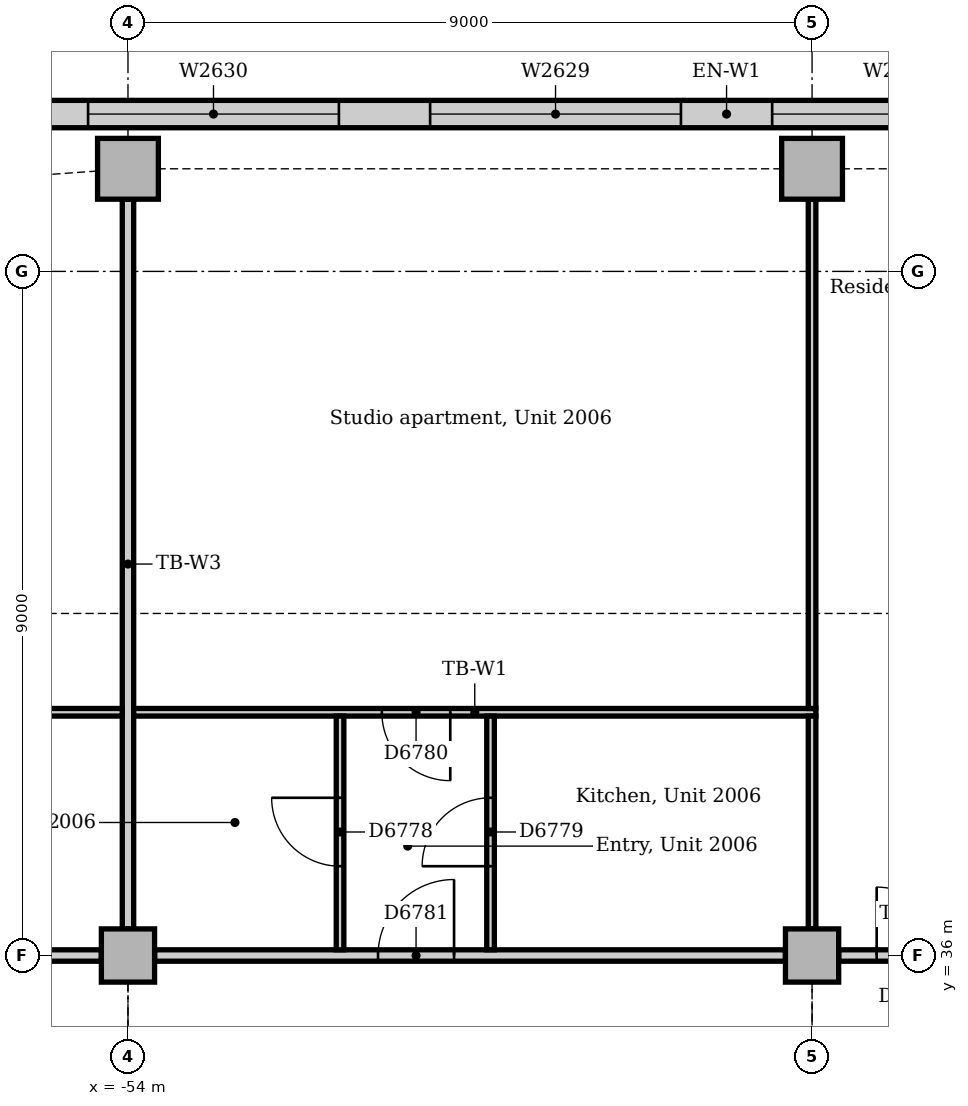
"""IFC4 building model, lengths in metres.
Left out: names, types, materials, properties, quantities, classifications, styles, units other than length and angle.
Written with IfcOpenShell. Run it as: python <this file> out.ifc"""

import sys

from ifc_helpers import new_model, si_unit, direction, frame, frame_2d, origin, origin_2d, place, context, subcontext, project, spatial, rectangle, extrude, element, fill, save


model = new_model("IFC4")
c1 = context("Model", 3, precision=1e-05, world=origin(), true_north=direction((0.0, 1.0)))
c2 = subcontext(c1, "Body", "Model", "MODEL_VIEW")
j1 = project(units=[si_unit("LENGTHUNIT", "METRE"), si_unit("PLANEANGLEUNIT", "RADIAN")], contexts=[c1])
p1 = place(None, origin())
s1 = spatial("IfcSite", under=j1, at=p1, CompositionType="ELEMENT")
p2 = place(p1, origin())
s2 = spatial("IfcBuilding", under=s1, at=p2, CompositionType="ELEMENT")
p3 = place(p2, frame((0.0, 0.0, 87.0)))
s3 = spatial("IfcBuildingStorey", under=s2, at=p3, CompositionType="ELEMENT", Elevation=87.0)
for number, where, z_axis, x_axis in (
    (1, (-54.0, 46.35, 0.0), (0.0, 0.0, 1.0), (1.0, 0.0, 0.0)),
    (2, (-45.0, 46.35, 0.0), (0.0, 0.0, 1.0), (1.0, 0.0, 0.0)),
):
    element("IfcColumn", number, at=place(p3, frame(where, z_axis=z_axis, x_axis=x_axis)), inside=s3, PredefinedType="COLUMN", context=c2, shape_type="SweptSolid", body=[
        extrude(rectangle(XDim=0.8, YDim=0.8, at=origin_2d()), origin(), (0.0, 0.0, 1.0), 3.85),
    ])
for number, where, z_axis, x_axis in (
    (3, (-54.0, 36.0, 0.0), (0.0, 0.0, 1.0), (1.0, 0.0, 0.0)),
    (4, (-45.0, 36.0, 0.0), (0.0, 0.0, 1.0), (1.0, 0.0, 0.0)),
):
    element("IfcColumn", number, at=place(p3, frame(where, z_axis=z_axis, x_axis=x_axis)), inside=s3, PredefinedType="COLUMN", context=c2, shape_type="SweptSolid", body=[
        extrude(rectangle(XDim=0.7, YDim=0.7, at=origin_2d()), origin(), (0.0, 0.0, 1.0), 3.85),
    ])
p4 = place(p3, frame((-31.243, 47.07, 0.0), z_axis=(0.0, 0.0, 1.0), x_axis=(-1.0, 0.0, 0.0)))
e5 = element("IfcWall", 5, at=p4, inside=s3, PredefinedType="STANDARD", context=c2, shape_type="SweptSolid", body=[
    extrude(rectangle(XDim=29.765, YDim=0.36, at=frame_2d((14.882, 0.0))), origin(), (0.0, 0.0, 1.0), 3.85),
])
p5 = place(p4, frame((1.982, 0.0, 0.9)))
e6 = element("IfcOpeningElement", 6, at=p5, cuts=e5, PredefinedType="OPENING", context=c2, shape_type="SweptSolid", body=[
    extrude(rectangle(XDim=3.3, YDim=1.6, at=frame_2d((1.65, 0.8))), frame((0.0, 0.19, 0.0), z_axis=(0.0, -1.0, 0.0), x_axis=(1.0, 0.0, 0.0)), (0.0, 0.0, 1.0), 0.38),
])
p6 = place(p4, frame((6.482, 0.0, 0.9)))
e7 = element("IfcOpeningElement", 7, at=p6, cuts=e5, PredefinedType="OPENING", context=c2, shape_type="SweptSolid", body=[
    extrude(rectangle(XDim=3.3, YDim=1.6, at=frame_2d((1.65, 0.8))), frame((0.0, 0.19, 0.0), z_axis=(0.0, -1.0, 0.0), x_axis=(1.0, 0.0, 0.0)), (0.0, 0.0, 1.0), 0.38),
])
p7 = place(p4, frame((10.982, 0.0, 0.9)))
e8 = element("IfcOpeningElement", 8, at=p7, cuts=e5, PredefinedType="OPENING", context=c2, shape_type="SweptSolid", body=[
    extrude(rectangle(XDim=3.3, YDim=1.6, at=frame_2d((1.65, 0.8))), frame((0.0, 0.19, 0.0), z_axis=(0.0, -1.0, 0.0), x_axis=(1.0, 0.0, 0.0)), (0.0, 0.0, 1.0), 0.38),
])
p8 = place(p4, frame((15.482, 0.0, 0.9)))
e9 = element("IfcOpeningElement", 9, at=p8, cuts=e5, PredefinedType="OPENING", context=c2, shape_type="SweptSolid", body=[
    extrude(rectangle(XDim=3.3, YDim=1.6, at=frame_2d((1.65, 0.8))), frame((0.0, 0.19, 0.0), z_axis=(0.0, -1.0, 0.0), x_axis=(1.0, 0.0, 0.0)), (0.0, 0.0, 1.0), 0.38),
])
p9 = place(p4, frame((19.982, 0.0, 0.9)))
e10 = element("IfcOpeningElement", 10, at=p9, cuts=e5, PredefinedType="OPENING", context=c2, shape_type="SweptSolid", body=[
    extrude(rectangle(XDim=3.3, YDim=1.6, at=frame_2d((1.65, 0.8))), frame((0.0, 0.19, 0.0), z_axis=(0.0, -1.0, 0.0), x_axis=(1.0, 0.0, 0.0)), (0.0, 0.0, 1.0), 0.38),
])
p10 = place(p4, frame((24.482, 0.0, 0.9)))
e11 = element("IfcOpeningElement", 11, at=p10, cuts=e5, PredefinedType="OPENING", context=c2, shape_type="SweptSolid", body=[
    extrude(rectangle(XDim=3.3, YDim=1.6, at=frame_2d((1.65, 0.8))), frame((0.0, 0.19, 0.0), z_axis=(0.0, -1.0, 0.0), x_axis=(1.0, 0.0, 0.0)), (0.0, 0.0, 1.0), 0.38),
])
p11 = place(p3, frame((-44.65, 36.0, 0.0), z_axis=(0.0, 0.0, 1.0), x_axis=(1.0, 0.0, 0.0)))
e12 = element("IfcWall", 12, at=p11, inside=s3, PredefinedType="PARTITIONING", context=c2, shape_type="SweptSolid", body=[
    extrude(rectangle(XDim=1.925, YDim=0.15, at=frame_2d((0.963, 0.0))), origin(), (0.0, 0.0, 1.0), 3.602),
])
p12 = place(p11, frame((0.5, 0.0, 0.0)))
e13 = element("IfcOpeningElement", 13, at=p12, cuts=e12, PredefinedType="OPENING", context=c2, shape_type="SweptSolid", body=[
    extrude(rectangle(XDim=0.9, YDim=2.1, at=frame_2d((0.45, 1.05))), frame((0.0, 0.085, 0.0), z_axis=(0.0, -1.0, 0.0), x_axis=(1.0, 0.0, 0.0)), (0.0, 0.0, 1.0), 0.17),
])
p13 = place(p3, frame((-53.65, 36.0, 0.0), z_axis=(0.0, 0.0, 1.0), x_axis=(1.0, 0.0, 0.0)))
e14 = element("IfcWall", 14, at=p13, inside=s3, PredefinedType="PARTITIONING", context=c2, shape_type="SweptSolid", body=[
    extrude(rectangle(XDim=8.3, YDim=0.15, at=frame_2d((4.15, 0.0))), origin(), (0.0, 0.0, 1.0), 3.158),
])
p14 = place(p13, frame((2.94, 0.0, 0.0)))
e15 = element("IfcOpeningElement", 15, at=p14, cuts=e14, PredefinedType="OPENING", context=c2, shape_type="SweptSolid", body=[
    extrude(rectangle(XDim=1.0, YDim=2.1, at=frame_2d((0.5, 1.05))), frame((0.0, 0.085, 0.0), z_axis=(0.0, -1.0, 0.0), x_axis=(1.0, 0.0, 0.0)), (0.0, 0.0, 1.0), 0.17),
])
p15 = place(p3, frame((-62.6, 36.0, 0.0), z_axis=(0.0, 0.0, 1.0), x_axis=(1.0, 0.0, 0.0)))
e16 = element("IfcWall", 16, at=p15, inside=s3, PredefinedType="PARTITIONING", context=c2, shape_type="SweptSolid", body=[
    extrude(rectangle(XDim=8.25, YDim=0.15, at=frame_2d((4.125, 0.0))), origin(), (0.0, 0.0, 1.0), 3.158),
])
p16 = place(p15, frame((1.786, 0.0, 0.0)))
e17 = element("IfcOpeningElement", 17, at=p16, cuts=e16, PredefinedType="OPENING", context=c2, shape_type="SweptSolid", body=[
    extrude(rectangle(XDim=1.0, YDim=2.1, at=frame_2d((0.5, 1.05))), frame((0.0, 0.085, 0.0), z_axis=(0.0, -1.0, 0.0), x_axis=(1.0, 0.0, 0.0)), (0.0, 0.0, 1.0), 0.17),
])
p17 = place(p3, frame((-54.0, 36.35, 0.0), z_axis=(0.0, 0.0, 1.0), x_axis=(0.0, 1.0, 0.0)))
e18 = element("IfcWall", 18, at=p17, inside=s3, PredefinedType="PARTITIONING", context=c2, shape_type="SweptSolid", body=[
    extrude(rectangle(XDim=9.6, YDim=0.15, at=frame_2d((4.8, 0.0))), origin(), (0.0, 0.0, 1.0), 3.256),
])
p18 = place(p3, frame((-53.925, 39.2, 0.0), z_axis=(0.0, 0.0, 1.0), x_axis=(1.0, 0.0, 0.0)))
e19 = element("IfcWall", 19, at=p18, inside=s3, PredefinedType="PARTITIONING", context=c2, shape_type="SweptSolid", body=[
    extrude(rectangle(XDim=8.975, YDim=0.1, at=frame_2d((4.487, 0.0))), origin(), (0.0, 0.0, 1.0), 3.85),
])
p19 = place(p18, frame((3.265, 0.0, 0.0)))
e20 = element("IfcOpeningElement", 20, at=p19, cuts=e19, PredefinedType="OPENING", context=c2, shape_type="SweptSolid", body=[
    extrude(rectangle(XDim=0.9, YDim=2.1, at=frame_2d((0.45, 1.05))), frame((0.0, 0.06, 0.0), z_axis=(0.0, -1.0, 0.0), x_axis=(1.0, 0.0, 0.0)), (0.0, 0.0, 1.0), 0.12),
])
p20 = place(p3, frame((-64.89, 39.2, 0.0), z_axis=(0.0, 0.0, 1.0), x_axis=(1.0, 0.0, 0.0)))
e21 = element("IfcWall", 21, at=p20, inside=s3, PredefinedType="PARTITIONING", context=c2, shape_type="SweptSolid", body=[
    extrude(rectangle(XDim=10.815, YDim=0.1, at=frame_2d((5.407, 0.0))), origin(), (0.0, 0.0, 1.0), 3.85),
])
p21 = place(p20, frame((4.126, 0.0, 0.0)))
e22 = element("IfcOpeningElement", 22, at=p21, cuts=e21, PredefinedType="OPENING", context=c2, shape_type="SweptSolid", body=[
    extrude(rectangle(XDim=0.9, YDim=2.1, at=frame_2d((0.45, 1.05))), frame((0.0, 0.06, 0.0), z_axis=(0.0, -1.0, 0.0), x_axis=(1.0, 0.0, 0.0)), (0.0, 0.0, 1.0), 0.12),
])
p22 = place(p3, frame((-45.0, 39.25, 0.0), z_axis=(0.0, 0.0, 1.0), x_axis=(0.0, 1.0, 0.0)))
e23 = element("IfcWall", 23, at=p22, inside=s3, PredefinedType="PARTITIONING", context=c2, shape_type="SweptSolid", body=[
    extrude(rectangle(XDim=6.7, YDim=0.1, at=frame_2d((3.35, 0.0))), origin(), (0.0, 0.0, 1.0), 3.256),
])
p23 = place(p3, frame((-45.0, 36.35, 0.0), z_axis=(0.0, 0.0, 1.0), x_axis=(0.0, 1.0, 0.0)))
e24 = element("IfcWall", 24, at=p23, inside=s3, PredefinedType="PARTITIONING", context=c2, shape_type="SweptSolid", body=[
    extrude(rectangle(XDim=2.8, YDim=0.1, at=frame_2d((1.4, 0.0))), origin(), (0.0, 0.0, 1.0), 3.256),
])
p24 = place(p3, frame((-51.21, 36.075, 0.0), z_axis=(0.0, 0.0, 1.0), x_axis=(0.0, 1.0, 0.0)))
e25 = element("IfcWall", 25, at=p24, inside=s3, PredefinedType="PARTITIONING", context=c2, shape_type="SweptSolid", body=[
    extrude(rectangle(XDim=3.075, YDim=0.1, at=frame_2d((1.538, 0.0))), origin(), (0.0, 0.0, 1.0), 3.85),
])
p25 = place(p24, frame((1.1, 0.0, 0.0)))
e26 = element("IfcOpeningElement", 26, at=p25, cuts=e25, PredefinedType="OPENING", context=c2, shape_type="SweptSolid", body=[
    extrude(rectangle(XDim=0.9, YDim=2.1, at=frame_2d((0.45, 1.05))), frame((0.0, 0.06, 0.0), z_axis=(0.0, -1.0, 0.0), x_axis=(1.0, 0.0, 0.0)), (0.0, 0.0, 1.0), 0.12),
])
p26 = place(p3, frame((-49.23, 36.075, 0.0), z_axis=(0.0, 0.0, 1.0), x_axis=(0.0, 1.0, 0.0)))
e27 = element("IfcWall", 27, at=p26, inside=s3, PredefinedType="PARTITIONING", context=c2, shape_type="SweptSolid", body=[
    extrude(rectangle(XDim=3.075, YDim=0.1, at=frame_2d((1.538, 0.0))), origin(), (0.0, 0.0, 1.0), 3.85),
])
p27 = place(p26, frame((1.1, 0.0, 0.0)))
e28 = element("IfcOpeningElement", 28, at=p27, cuts=e27, PredefinedType="OPENING", context=c2, shape_type="SweptSolid", body=[
    extrude(rectangle(XDim=0.9, YDim=2.1, at=frame_2d((0.45, 1.05))), frame((0.0, 0.06, 0.0), z_axis=(0.0, -1.0, 0.0), x_axis=(1.0, 0.0, 0.0)), (0.0, 0.0, 1.0), 0.12),
])
p28 = place(p7, origin())
e29 = element("IfcWindow", 29, at=p28, inside=s3, PartitioningType="SINGLE_PANEL", PredefinedType="WINDOW", context=c2, shape_type="SweptSolid", body=[
    extrude(rectangle(XDim=3.3, YDim=1.6, at=frame_2d((1.65, 0.8))), frame((0.0, 0.13, 0.0), z_axis=(0.0, -1.0, 0.0), x_axis=(1.0, 0.0, 0.0)), (0.0, 0.0, 1.0), 0.06),
])
fill(e8, e29)
p29 = place(p8, origin())
e30 = element("IfcWindow", 30, at=p29, inside=s3, PartitioningType="SINGLE_PANEL", PredefinedType="WINDOW", context=c2, shape_type="SweptSolid", body=[
    extrude(rectangle(XDim=3.3, YDim=1.6, at=frame_2d((1.65, 0.8))), frame((0.0, 0.13, 0.0), z_axis=(0.0, -1.0, 0.0), x_axis=(1.0, 0.0, 0.0)), (0.0, 0.0, 1.0), 0.06),
])
fill(e9, e30)
p30 = place(p9, origin())
e31 = element("IfcWindow", 31, at=p30, inside=s3, PartitioningType="SINGLE_PANEL", PredefinedType="WINDOW", context=c2, shape_type="SweptSolid", body=[
    extrude(rectangle(XDim=3.3, YDim=1.6, at=frame_2d((1.65, 0.8))), frame((0.0, 0.13, 0.0), z_axis=(0.0, -1.0, 0.0), x_axis=(1.0, 0.0, 0.0)), (0.0, 0.0, 1.0), 0.06),
])
fill(e10, e31)
p31 = place(p12, origin())
e32 = element("IfcDoor", 32, at=p31, inside=s3, OperationType="SINGLE_SWING_LEFT", PredefinedType="DOOR", context=c2, shape_type="SweptSolid", body=[
    extrude(rectangle(XDim=0.9, YDim=2.1, at=frame_2d((0.45, 1.05))), frame((0.0, 0.025, 0.0), z_axis=(0.0, -1.0, 0.0), x_axis=(1.0, 0.0, 0.0)), (0.0, 0.0, 1.0), 0.05),
])
fill(e13, e32)
p32 = place(p25, origin())
e33 = element("IfcDoor", 33, at=p32, inside=s3, OperationType="SINGLE_SWING_RIGHT", PredefinedType="DOOR", context=c2, shape_type="SweptSolid", body=[
    extrude(rectangle(XDim=0.9, YDim=2.1, at=frame_2d((0.45, 1.05))), frame((0.0, 0.025, 0.0), z_axis=(0.0, -1.0, 0.0), x_axis=(1.0, 0.0, 0.0)), (0.0, 0.0, 1.0), 0.05),
])
fill(e26, e33)
p33 = place(p27, origin())
e34 = element("IfcDoor", 34, at=p33, inside=s3, OperationType="SINGLE_SWING_LEFT", PredefinedType="DOOR", context=c2, shape_type="SweptSolid", body=[
    extrude(rectangle(XDim=0.9, YDim=2.1, at=frame_2d((0.45, 1.05))), frame((0.0, 0.025, 0.0), z_axis=(0.0, -1.0, 0.0), x_axis=(1.0, 0.0, 0.0)), (0.0, 0.0, 1.0), 0.05),
])
fill(e28, e34)
p34 = place(p19, frame((0.9, 0.0, 0.0), z_axis=(0.0, 0.0, 1.0), x_axis=(-1.0, 0.0, 0.0)))
e35 = element("IfcDoor", 35, at=p34, inside=s3, OperationType="SINGLE_SWING_LEFT", PredefinedType="DOOR", context=c2, shape_type="SweptSolid", body=[
    extrude(rectangle(XDim=0.9, YDim=2.1, at=frame_2d((0.45, 1.05))), frame((0.0, 0.025, 0.0), z_axis=(0.0, -1.0, 0.0), x_axis=(1.0, 0.0, 0.0)), (0.0, 0.0, 1.0), 0.05),
])
fill(e20, e35)
p35 = place(p14, origin())
e36 = element("IfcDoor", 36, at=p35, inside=s3, OperationType="SINGLE_SWING_RIGHT", PredefinedType="DOOR", context=c2, shape_type="SweptSolid", body=[
    extrude(rectangle(XDim=1.0, YDim=2.1, at=frame_2d((0.5, 1.05))), frame((0.0, 0.025, 0.0), z_axis=(0.0, -1.0, 0.0), x_axis=(1.0, 0.0, 0.0)), (0.0, 0.0, 1.0), 0.05),
])
fill(e15, e36)
save(model, sys.argv[1])
